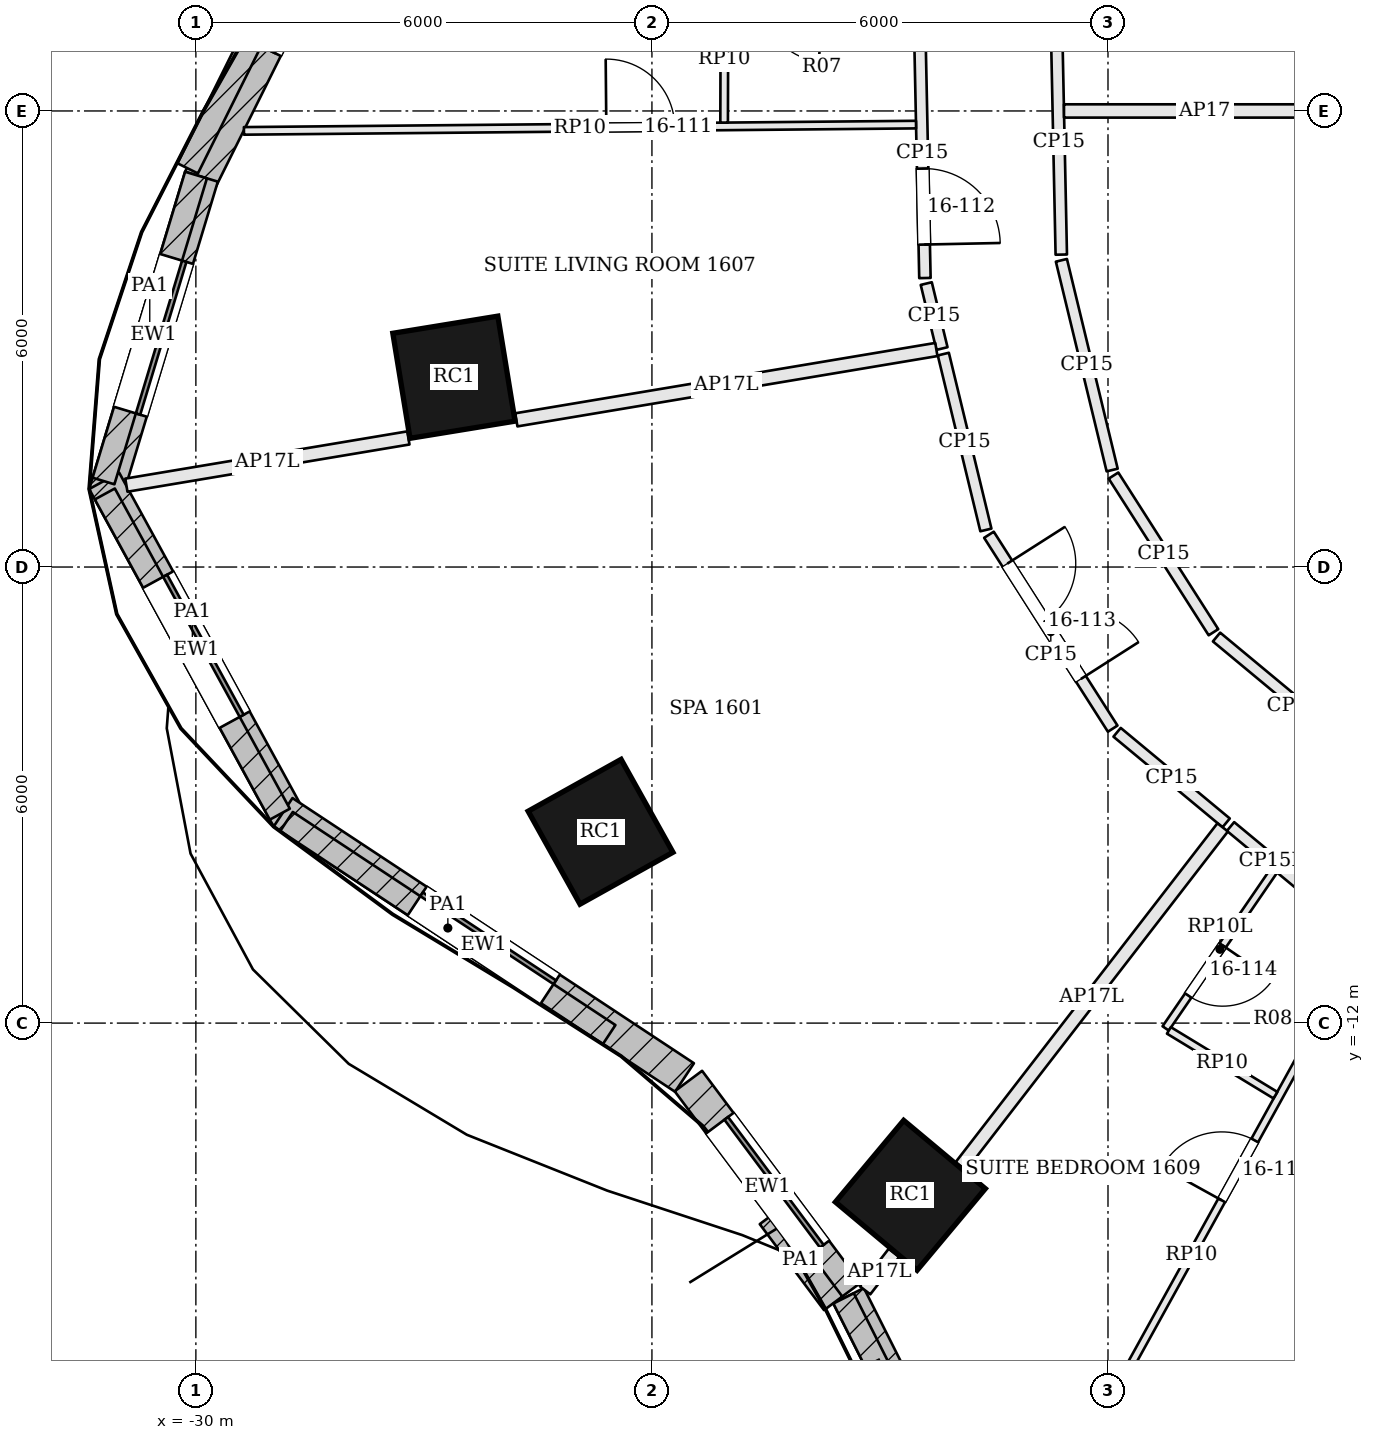
"""IFC4 building model, lengths in metres.
Left out: names, types, materials, properties, quantities, classifications, styles, units other than length and angle.
Written with IfcOpenShell. Run it as: python <this file> out.ifc"""

import sys

from ifc_helpers import new_model, si_unit, direction, frame, frame_2d, origin, origin_2d, place, context, subcontext, project, spatial, rectangle, extrude, element, fill, save


model = new_model("IFC4")
c1 = context("Model", 3, precision=1e-05, world=origin(), true_north=direction((0.0, 1.0)))
c2 = subcontext(c1, "Body", "Model", "MODEL_VIEW")
j1 = project(units=[si_unit("LENGTHUNIT", "METRE"), si_unit("PLANEANGLEUNIT", "RADIAN")], contexts=[c1])
p1 = place(None, origin())
s1 = spatial("IfcSite", under=j1, at=p1, CompositionType="ELEMENT")
p2 = place(p1, origin())
s2 = spatial("IfcBuilding", under=s1, at=p2, CompositionType="ELEMENT")
p3 = place(p2, frame((0.0, 0.0, 73.5)))
s3 = spatial("IfcBuildingStorey", under=s2, at=p3, CompositionType="ELEMENT", Elevation=73.5)
for number, where, z_axis, x_axis in (
    (1, (-26.605, -3.503, 0.0), (0.0, 0.0, 1.0), (0.161, -0.987, 0.0)),
    (2, (-24.676, -9.483, 0.0), (0.0, 0.0, 1.0), (0.487, -0.873, 0.0)),
    (3, (-20.6, -14.266, 0.0), (0.0, 0.0, 1.0), (0.767, -0.641, 0.0)),
):
    element("IfcColumn", number, at=place(p3, frame(where, z_axis=z_axis, x_axis=x_axis)), inside=s3, PredefinedType="COLUMN", context=c2, shape_type="SweptSolid", body=[
        extrude(rectangle(XDim=1.4, YDim=1.4, at=origin_2d()), origin(), (0.0, 0.0, 1.0), 2.8),
    ])
p4 = place(p3, frame((-27.294, 4.427, 0.0), z_axis=(0.0, 0.0, 1.0), x_axis=(-0.444913249375, -0.895573671191, 0.0)))
e4 = element("IfcWall", 4, at=p4, inside=s3, PredefinedType="SOLIDWALL", context=c2, shape_type="SweptSolid", body=[
    extrude(rectangle(XDim=5.947, YDim=0.45, at=frame_2d((2.974, 0.0))), origin(), (0.0, 0.0, 1.0), 3.3),
])
p5 = place(p4, frame((1.924, 0.0, 0.9)))
e5 = element("IfcOpeningElement", 5, at=p5, cuts=e4, PredefinedType="OPENING", context=c2, shape_type="SweptSolid", body=[
    extrude(rectangle(XDim=2.1, YDim=1.8, at=frame_2d((1.05, 0.9))), frame((0.0, 0.235, 0.0), z_axis=(0.0, -1.0, 0.0), x_axis=(1.0, 0.0, 0.0)), (0.0, 0.0, 1.0), 0.47),
])
p6 = place(p3, frame((-29.927, -0.865, 0.0), z_axis=(0.0, 0.0, 1.0), x_axis=(-0.289432445378, -0.957198443147, 0.0)))
e6 = element("IfcWall", 6, at=p6, inside=s3, PredefinedType="SOLIDWALL", context=c2, shape_type="SweptSolid", body=[
    extrude(rectangle(XDim=4.361, YDim=0.45, at=frame_2d((2.181, 0.0))), origin(), (0.0, 0.0, 1.0), 3.3),
])
p7 = place(p6, frame((1.131, 0.0, 0.9)))
e7 = element("IfcOpeningElement", 7, at=p7, cuts=e6, PredefinedType="OPENING", context=c2, shape_type="SweptSolid", body=[
    extrude(rectangle(XDim=2.1, YDim=1.8, at=frame_2d((1.05, 0.9))), frame((0.0, 0.235, 0.0), z_axis=(0.0, -1.0, 0.0), x_axis=(1.0, 0.0, 0.0)), (0.0, 0.0, 1.0), 0.47),
])
p8 = place(p3, frame((-31.207, -4.866, 0.0), z_axis=(0.0, 0.0, 1.0), x_axis=(0.479565142605, -0.877506281458, 0.0)))
e8 = element("IfcWall", 8, at=p8, inside=s3, PredefinedType="SOLIDWALL", context=c2, shape_type="SweptSolid", body=[
    extrude(rectangle(XDim=5.061, YDim=0.45, at=frame_2d((2.53, 0.0))), origin(), (0.0, 0.0, 1.0), 3.3),
])
p9 = place(p8, frame((1.48, 0.0, 0.9)))
e9 = element("IfcOpeningElement", 9, at=p9, cuts=e8, PredefinedType="OPENING", context=c2, shape_type="SweptSolid", body=[
    extrude(rectangle(XDim=2.1, YDim=1.8, at=frame_2d((1.05, 0.9))), frame((0.0, 0.235, 0.0), z_axis=(0.0, -1.0, 0.0), x_axis=(1.0, 0.0, 0.0)), (0.0, 0.0, 1.0), 0.47),
])
p10 = place(p3, frame((-28.853, -9.227, 0.0), z_axis=(0.0, 0.0, 1.0), x_axis=(0.834404370393, -0.551152743502, 0.0)))
e10 = element("IfcWall", 10, at=p10, inside=s3, PredefinedType="SOLIDWALL", context=c2, shape_type="SweptSolid", body=[
    extrude(rectangle(XDim=6.33, YDim=0.45, at=frame_2d((3.165, 0.0))), origin(), (0.0, 0.0, 1.0), 3.3),
])
p11 = place(p10, frame((2.115, 0.0, 0.9)))
e11 = element("IfcOpeningElement", 11, at=p11, cuts=e10, PredefinedType="OPENING", context=c2, shape_type="SweptSolid", body=[
    extrude(rectangle(XDim=2.1, YDim=1.8, at=frame_2d((1.05, 0.9))), frame((0.0, 0.235, 0.0), z_axis=(0.0, -1.0, 0.0), x_axis=(1.0, 0.0, 0.0)), (0.0, 0.0, 1.0), 0.47),
])
p12 = place(p3, frame((-23.52, -12.762, 0.0), z_axis=(0.0, 0.0, 1.0), x_axis=(0.598664281495, -0.801000048728, 0.0)))
e12 = element("IfcWall", 12, at=p12, inside=s3, PredefinedType="SOLIDWALL", context=c2, shape_type="SweptSolid", body=[
    extrude(rectangle(XDim=3.482, YDim=0.45, at=frame_2d((1.741, 0.0))), origin(), (0.0, 0.0, 1.0), 3.3),
])
p13 = place(p12, frame((0.691, 0.0, 0.9)))
e13 = element("IfcOpeningElement", 13, at=p13, cuts=e12, PredefinedType="OPENING", context=c2, shape_type="SweptSolid", body=[
    extrude(rectangle(XDim=2.1, YDim=1.8, at=frame_2d((1.05, 0.9))), frame((0.0, 0.235, 0.0), z_axis=(0.0, -1.0, 0.0), x_axis=(1.0, 0.0, 0.0)), (0.0, 0.0, 1.0), 0.47),
])
p14 = place(p3, frame((-21.413, -15.586, 0.0), z_axis=(0.0, 0.0, 1.0), x_axis=(0.449428064685, -0.893316525467, 0.0)))
e14 = element("IfcWall", 14, at=p14, inside=s3, PredefinedType="SOLIDWALL", context=c2, shape_type="SweptSolid", body=[
    extrude(rectangle(XDim=4.407, YDim=0.45, at=frame_2d((2.204, 0.0))), origin(), (0.0, 0.0, 1.0), 3.3),
])
p15 = place(p14, frame((1.154, 0.0, 0.9)))
e15 = element("IfcOpeningElement", 15, at=p15, cuts=e14, PredefinedType="OPENING", context=c2, shape_type="SweptSolid", body=[
    extrude(rectangle(XDim=2.1, YDim=1.8, at=frame_2d((1.05, 0.9))), frame((0.0, 0.235, 0.0), z_axis=(0.0, -1.0, 0.0), x_axis=(1.0, 0.0, 0.0)), (0.0, 0.0, 1.0), 0.47),
])
p16 = place(p3, frame((-27.859, 3.771, 3.6), z_axis=(0.0, 0.0, 1.0), x_axis=(-0.444912677503, -0.895573955292, 0.0)))
e16 = element("IfcWall", 16, at=p16, inside=s3, PredefinedType="PARAPET", context=c2, shape_type="SweptSolid", body=[
    extrude(rectangle(XDim=5.054, YDim=0.3, at=frame_2d((2.527, 0.0))), origin(), (0.0, 0.0, 1.0), 1.1),
])
p17 = place(p3, frame((-29.998, -0.843, 3.6), z_axis=(0.0, 0.0, 1.0), x_axis=(-0.289403108737, -0.95720731331, 0.0)))
e17 = element("IfcWall", 17, at=p17, inside=s3, PredefinedType="PARAPET", context=c2, shape_type="SweptSolid", body=[
    extrude(rectangle(XDim=4.205, YDim=0.3, at=frame_2d((2.103, 0.0))), origin(), (0.0, 0.0, 1.0), 1.1),
])
p18 = place(p3, frame((-31.198, -5.039, 3.6), z_axis=(0.0, 0.0, 1.0), x_axis=(0.479564593641, -0.877506581472, 0.0)))
e18 = element("IfcWall", 18, at=p18, inside=s3, PredefinedType="PARAPET", context=c2, shape_type="SweptSolid", body=[
    extrude(rectangle(XDim=4.801, YDim=0.3, at=frame_2d((2.4, 0.0))), origin(), (0.0, 0.0, 1.0), 1.1),
])
p19 = place(p3, frame((-28.807, -9.347, 3.6), z_axis=(0.0, 0.0, 1.0), x_axis=(0.834390896723, -0.551173141097, 0.0)))
e19 = element("IfcWall", 19, at=p19, inside=s3, PredefinedType="PARAPET", context=c2, shape_type="SweptSolid", body=[
    extrude(rectangle(XDim=5.087, YDim=0.3, at=frame_2d((2.543, 0.0))), origin(), (0.0, 0.0, 1.0), 1.1),
])
p20 = place(p3, frame((-22.461, -14.555, 3.6), z_axis=(0.0, 0.0, 1.0), x_axis=(0.598672247422, -0.800994094964, 0.0)))
e20 = element("IfcWall", 20, at=p20, inside=s3, PredefinedType="PARAPET", context=c2, shape_type="SweptSolid", body=[
    extrude(rectangle(XDim=1.413, YDim=0.3, at=frame_2d((0.707, 0.0))), origin(), (0.0, 0.0, 1.0), 1.1),
])
p21 = place(p3, frame((-21.479, -15.622, 3.6), z_axis=(0.0, 0.0, 1.0), x_axis=(0.44940640722, -0.893327421022, 0.0)))
e21 = element("IfcWall", 21, at=p21, inside=s3, PredefinedType="PARAPET", context=c2, shape_type="SweptSolid", body=[
    extrude(rectangle(XDim=4.317, YDim=0.3, at=frame_2d((2.159, 0.0))), origin(), (0.0, 0.0, 1.0), 1.1),
])
p22 = place(p3, frame((-20.477, 1.092, 0.0), z_axis=(0.0, 0.0, 1.0), x_axis=(0.020774736247, -0.999784181878, 0.0)))
e22 = element("IfcWall", 22, at=p22, inside=s3, PredefinedType="PARTITIONING", context=c2, shape_type="SweptSolid", body=[
    extrude(rectangle(XDim=3.291, YDim=0.15, at=frame_2d((1.645, 0.0))), origin(), (0.0, 0.0, 1.0), 2.684),
])
p23 = place(p22, frame((1.85, 0.0, 0.0)))
e23 = element("IfcOpeningElement", 23, at=p23, cuts=e22, PredefinedType="OPENING", context=c2, shape_type="SweptSolid", body=[
    extrude(rectangle(XDim=1.0, YDim=2.1, at=frame_2d((0.5, 1.05))), frame((0.0, 0.085, 0.0), z_axis=(0.0, -1.0, 0.0), x_axis=(1.0, 0.0, 0.0)), (0.0, 0.0, 1.0), 0.17),
])
p24 = place(p3, frame((-20.391, -2.271, 0.0), z_axis=(0.0, 0.0, 1.0), x_axis=(0.235147086106, -0.971959797469, 0.0)))
e24 = element("IfcWall", 24, at=p24, inside=s3, PredefinedType="PARTITIONING", context=c2, shape_type="SweptSolid", body=[
    extrude(rectangle(XDim=0.879, YDim=0.15, at=frame_2d((0.44, 0.0))), origin(), (0.0, 0.0, 1.0), 2.684),
])
p25 = place(p3, frame((-30.914, -4.923, 0.0), z_axis=(0.0, 0.0, 1.0), x_axis=(0.986255007441, 0.165230324995, 0.0)))
e25 = element("IfcWall", 25, at=p25, inside=s3, PredefinedType="PARTITIONING", context=c2, shape_type="SweptSolid", body=[
    extrude(rectangle(XDim=3.762, YDim=0.175, at=frame_2d((1.881, 0.0))), origin(), (0.0, 0.0, 1.0), 2.28),
])
p26 = place(p3, frame((-25.784, -4.064, 0.0), z_axis=(0.0, 0.0, 1.0), x_axis=(0.986261705635, 0.165190338697, 0.0)))
e26 = element("IfcWall", 26, at=p26, inside=s3, PredefinedType="PARTITIONING", context=c2, shape_type="SweptSolid", body=[
    extrude(rectangle(XDim=5.603, YDim=0.175, at=frame_2d((2.801, 0.0))), origin(), (0.0, 0.0, 1.0), 2.28),
])
p27 = place(p3, frame((-20.167, -3.199, 0.0), z_axis=(0.0, 0.0, 1.0), x_axis=(0.235288843044, -0.971925491146, 0.0)))
e27 = element("IfcWall", 27, at=p27, inside=s3, PredefinedType="PARTITIONING", context=c2, shape_type="SweptSolid", body=[
    extrude(rectangle(XDim=2.38, YDim=0.15, at=frame_2d((1.19, 0.0))), origin(), (0.0, 0.0, 1.0), 2.684),
])
p28 = place(p3, frame((-19.566, -5.575, 0.0), z_axis=(0.0, 0.0, 1.0), x_axis=(0.538039111825, -0.842919874096, 0.0)))
e28 = element("IfcWall", 28, at=p28, inside=s3, PredefinedType="PARTITIONING", context=c2, shape_type="SweptSolid", body=[
    extrude(rectangle(XDim=3.026, YDim=0.15, at=frame_2d((1.513, 0.0))), origin(), (0.0, 0.0, 1.0), 2.684),
])
p29 = place(p28, frame((0.45, 0.0, 0.0)))
e29 = element("IfcOpeningElement", 29, at=p29, cuts=e28, PredefinedType="OPENING", context=c2, shape_type="SweptSolid", body=[
    extrude(rectangle(XDim=1.8, YDim=2.1, at=frame_2d((0.9, 1.05))), frame((0.0, 0.085, 0.0), z_axis=(0.0, -1.0, 0.0), x_axis=(1.0, 0.0, 0.0)), (0.0, 0.0, 1.0), 0.17),
])
p30 = place(p3, frame((-17.88, -8.174, 0.0), z_axis=(0.0, 0.0, 1.0), x_axis=(0.769400173999, -0.638767071983, 0.0)))
e30 = element("IfcWall", 30, at=p30, inside=s3, PredefinedType="PARTITIONING", context=c2, shape_type="SweptSolid", body=[
    extrude(rectangle(XDim=1.865, YDim=0.15, at=frame_2d((0.933, 0.0))), origin(), (0.0, 0.0, 1.0), 2.684),
])
p31 = place(p3, frame((-21.197, -15.515, 0.0), z_axis=(0.0, 0.0, 1.0), x_axis=(0.61138040292, 0.791336845424, 0.0)))
e31 = element("IfcWall", 31, at=p31, inside=s3, PredefinedType="PARTITIONING", context=c2, shape_type="SweptSolid", body=[
    extrude(rectangle(XDim=0.621, YDim=0.175, at=frame_2d((0.311, 0.0))), origin(), (0.0, 0.0, 1.0), 2.28),
])
p32 = place(p3, frame((-19.936, -13.883, 0.0), z_axis=(0.0, 0.0, 1.0), x_axis=(0.611393230735, 0.791326934592, 0.0)))
e32 = element("IfcWall", 32, at=p32, inside=s3, PredefinedType="PARTITIONING", context=c2, shape_type="SweptSolid", body=[
    extrude(rectangle(XDim=5.634, YDim=0.175, at=frame_2d((2.817, 0.0))), origin(), (0.0, 0.0, 1.0), 2.28),
])
p33 = place(p3, frame((-16.388, -9.414, 0.0), z_axis=(0.0, 0.0, 1.0), x_axis=(0.76933395119, -0.638846829487, 0.0)))
e33 = element("IfcWall", 33, at=p33, inside=s3, PredefinedType="PARTITIONING", context=c2, shape_type="SweptSolid", body=[
    extrude(rectangle(XDim=1.401, YDim=0.15, at=frame_2d((0.701, 0.0))), origin(), (0.0, 0.0, 1.0), 2.58),
])
p34 = place(p3, frame((-14.388, -8.734, 0.0), z_axis=(0.0, 0.0, 1.0), x_axis=(-0.769376381092, 0.63879572965, 0.0)))
e34 = element("IfcWall", 34, at=p34, inside=s3, PredefinedType="PARTITIONING", context=c2, shape_type="SweptSolid", body=[
    extrude(rectangle(XDim=2.838, YDim=0.15, at=frame_2d((1.419, 0.0))), origin(), (0.0, 0.0, 1.0), 2.58),
])
p35 = place(p3, frame((-16.612, -6.858, 0.0), z_axis=(0.0, 0.0, 1.0), x_axis=(-0.53797355371, 0.842961716514, 0.0)))
e35 = element("IfcWall", 35, at=p35, inside=s3, PredefinedType="PARTITIONING", context=c2, shape_type="SweptSolid", body=[
    extrude(rectangle(XDim=2.445, YDim=0.15, at=frame_2d((1.222, 0.0))), origin(), (0.0, 0.0, 1.0), 2.684),
])
p36 = place(p3, frame((-17.945, -4.724, 0.0), z_axis=(0.0, 0.0, 1.0), x_axis=(-0.235203730389, 0.971946091721, 0.0)))
e36 = element("IfcWall", 36, at=p36, inside=s3, PredefinedType="PARTITIONING", context=c2, shape_type="SweptSolid", body=[
    extrude(rectangle(XDim=2.839, YDim=0.15, at=frame_2d((1.419, 0.0))), origin(), (0.0, 0.0, 1.0), 2.684),
])
p37 = place(p3, frame((-18.615, -1.89, 0.0), z_axis=(0.0, 0.0, 1.0), x_axis=(-0.020789300895, 0.99978387913, 0.0)))
e37 = element("IfcWall", 37, at=p37, inside=s3, PredefinedType="PARTITIONING", context=c2, shape_type="SweptSolid", body=[
    extrude(rectangle(XDim=2.959, YDim=0.15, at=frame_2d((1.48, 0.0))), origin(), (0.0, 0.0, 1.0), 2.684),
])
p38 = place(p3, frame((-29.368, -0.262, 0.0), z_axis=(0.0, 0.0, 1.0), x_axis=(0.999956200621, 0.009359318369, 0.0)))
e38 = element("IfcWall", 38, at=p38, inside=s3, PredefinedType="PARTITIONING", context=c2, shape_type="SweptSolid", body=[
    extrude(rectangle(XDim=8.843, YDim=0.1, at=frame_2d((4.421, 0.0))), origin(), (0.0, 0.0, 1.0), 2.784),
])
p39 = place(p38, frame((4.768, 0.0, 0.0)))
e39 = element("IfcOpeningElement", 39, at=p39, cuts=e38, PredefinedType="OPENING", context=c2, shape_type="SweptSolid", body=[
    extrude(rectangle(XDim=0.9, YDim=2.4, at=frame_2d((0.45, 1.2))), frame((0.0, 0.06, 0.0), z_axis=(0.0, -1.0, 0.0), x_axis=(1.0, 0.0, 0.0)), (0.0, 0.0, 1.0), 0.12),
])
p40 = place(p3, frame((-23.045, 1.533, 0.0), z_axis=(0.0, 0.0, 1.0), x_axis=(-0.002895601007, -0.999995807739, 0.0)))
e40 = element("IfcWall", 40, at=p40, inside=s3, PredefinedType="PARTITIONING", context=c2, shape_type="SweptSolid", body=[
    extrude(rectangle(XDim=1.686, YDim=0.1, at=frame_2d((0.843, 0.0))), origin(), (0.0, 0.0, 1.0), 2.784),
])
p41 = place(p3, frame((-19.269, -19.337, 0.0), z_axis=(0.0, 0.0, 1.0), x_axis=(0.483529323195, 0.875328163383, 0.0)))
e41 = element("IfcWall", 41, at=p41, inside=s3, PredefinedType="PARTITIONING", context=c2, shape_type="SweptSolid", body=[
    extrude(rectangle(XDim=9.794, YDim=0.1, at=frame_2d((4.897, 0.0))), origin(), (0.0, 0.0, 1.0), 2.784),
])
p42 = place(p41, frame((5.719, 0.0, 0.0)))
e42 = element("IfcOpeningElement", 42, at=p42, cuts=e41, PredefinedType="OPENING", context=c2, shape_type="SweptSolid", body=[
    extrude(rectangle(XDim=0.9, YDim=2.4, at=frame_2d((0.45, 1.2))), frame((0.0, 0.06, 0.0), z_axis=(0.0, -1.0, 0.0), x_axis=(1.0, 0.0, 0.0)), (0.0, 0.0, 1.0), 0.12),
])
p43 = place(p3, frame((-15.813, -9.988, 0.0), z_axis=(0.0, 0.0, 1.0), x_axis=(-0.565740671071, -0.824583223875, 0.0)))
e43 = element("IfcWall", 43, at=p43, inside=s3, PredefinedType="PARTITIONING", context=c2, shape_type="SweptSolid", body=[
    extrude(rectangle(XDim=2.525, YDim=0.1, at=frame_2d((1.262, 0.0))), origin(), (0.0, 0.0, 1.0), 2.58),
])
p44 = place(p43, frame((1.2, 0.0, 0.0)))
e44 = element("IfcOpeningElement", 44, at=p44, cuts=e43, PredefinedType="OPENING", context=c2, shape_type="SweptSolid", body=[
    extrude(rectangle(XDim=0.8, YDim=2.1, at=frame_2d((0.4, 1.05))), frame((0.0, 0.06, 0.0), z_axis=(0.0, -1.0, 0.0), x_axis=(1.0, 0.0, 0.0)), (0.0, 0.0, 1.0), 0.12),
])
p45 = place(p3, frame((-17.198, -12.096, 0.0), z_axis=(0.0, 0.0, 1.0), x_axis=(0.85445715852, -0.51952186119, 0.0)))
e45 = element("IfcWall", 45, at=p45, inside=s3, PredefinedType="PARTITIONING", context=c2, shape_type="SweptSolid", body=[
    extrude(rectangle(XDim=1.64, YDim=0.1, at=frame_2d((0.82, 0.0))), origin(), (0.0, 0.0, 1.0), 2.784),
])
p46 = place(p3, frame((-18.579, 0.0, 0.0), z_axis=(0.0, 0.0, 1.0), x_axis=(1.0, 0.0, 0.0)))
e46 = element("IfcWall", 46, at=p46, inside=s3, PredefinedType="PARTITIONING", context=c2, shape_type="SweptSolid", body=[
    extrude(rectangle(XDim=3.704, YDim=0.175, at=frame_2d((1.852, 0.0))), origin(), (0.0, 0.0, 1.0), 2.798),
])
p47 = place(p5, origin())
e47 = element("IfcWindow", 47, at=p47, inside=s3, PartitioningType="SINGLE_PANEL", PredefinedType="WINDOW", context=c2, shape_type="SweptSolid", body=[
    extrude(rectangle(XDim=2.1, YDim=1.8, at=frame_2d((1.05, 0.9))), frame((0.0, 0.135, 0.0), z_axis=(0.0, -1.0, 0.0), x_axis=(1.0, 0.0, 0.0)), (0.0, 0.0, 1.0), 0.06),
])
fill(e5, e47)
p48 = place(p7, origin())
e48 = element("IfcWindow", 48, at=p48, inside=s3, PartitioningType="SINGLE_PANEL", PredefinedType="WINDOW", context=c2, shape_type="SweptSolid", body=[
    extrude(rectangle(XDim=2.1, YDim=1.8, at=frame_2d((1.05, 0.9))), frame((0.0, 0.135, 0.0), z_axis=(0.0, -1.0, 0.0), x_axis=(1.0, 0.0, 0.0)), (0.0, 0.0, 1.0), 0.06),
])
fill(e7, e48)
p49 = place(p9, origin())
e49 = element("IfcWindow", 49, at=p49, inside=s3, PartitioningType="SINGLE_PANEL", PredefinedType="WINDOW", context=c2, shape_type="SweptSolid", body=[
    extrude(rectangle(XDim=2.1, YDim=1.8, at=frame_2d((1.05, 0.9))), frame((0.0, 0.135, 0.0), z_axis=(0.0, -1.0, 0.0), x_axis=(1.0, 0.0, 0.0)), (0.0, 0.0, 1.0), 0.06),
])
fill(e9, e49)
p50 = place(p11, origin())
e50 = element("IfcWindow", 50, at=p50, inside=s3, PartitioningType="SINGLE_PANEL", PredefinedType="WINDOW", context=c2, shape_type="SweptSolid", body=[
    extrude(rectangle(XDim=2.1, YDim=1.8, at=frame_2d((1.05, 0.9))), frame((0.0, 0.135, 0.0), z_axis=(0.0, -1.0, 0.0), x_axis=(1.0, 0.0, 0.0)), (0.0, 0.0, 1.0), 0.06),
])
fill(e11, e50)
p51 = place(p13, origin())
e51 = element("IfcWindow", 51, at=p51, inside=s3, PartitioningType="SINGLE_PANEL", PredefinedType="WINDOW", context=c2, shape_type="SweptSolid", body=[
    extrude(rectangle(XDim=2.1, YDim=1.8, at=frame_2d((1.05, 0.9))), frame((0.0, 0.135, 0.0), z_axis=(0.0, -1.0, 0.0), x_axis=(1.0, 0.0, 0.0)), (0.0, 0.0, 1.0), 0.06),
])
fill(e13, e51)
p52 = place(p39, origin())
e52 = element("IfcDoor", 52, at=p52, inside=s3, OperationType="SINGLE_SWING_LEFT", PredefinedType="DOOR", context=c2, shape_type="SweptSolid", body=[
    extrude(rectangle(XDim=0.9, YDim=2.4, at=frame_2d((0.45, 1.2))), frame((0.0, 0.025, 0.0), z_axis=(0.0, -1.0, 0.0), x_axis=(1.0, 0.0, 0.0)), (0.0, 0.0, 1.0), 0.05),
])
fill(e39, e52)
p53 = place(p23, origin())
e53 = element("IfcDoor", 53, at=p53, inside=s3, OperationType="SINGLE_SWING_RIGHT", PredefinedType="DOOR", context=c2, shape_type="SweptSolid", body=[
    extrude(rectangle(XDim=1.0, YDim=2.1, at=frame_2d((0.5, 1.05))), frame((0.0, 0.025, 0.0), z_axis=(0.0, -1.0, 0.0), x_axis=(1.0, 0.0, 0.0)), (0.0, 0.0, 1.0), 0.05),
])
fill(e23, e53)
p54 = place(p29, origin())
e54 = element("IfcDoor", 54, at=p54, inside=s3, OperationType="DOUBLE_DOOR_SINGLE_SWING", PredefinedType="DOOR", context=c2, shape_type="SweptSolid", body=[
    extrude(rectangle(XDim=1.8, YDim=2.1, at=frame_2d((0.9, 1.05))), frame((0.0, 0.025, 0.0), z_axis=(0.0, -1.0, 0.0), x_axis=(1.0, 0.0, 0.0)), (0.0, 0.0, 1.0), 0.05),
])
fill(e29, e54)
p55 = place(p44, origin())
e55 = element("IfcDoor", 55, at=p55, inside=s3, OperationType="SINGLE_SWING_LEFT", PredefinedType="DOOR", context=c2, shape_type="SweptSolid", body=[
    extrude(rectangle(XDim=0.8, YDim=2.1, at=frame_2d((0.4, 1.05))), frame((0.0, 0.025, 0.0), z_axis=(0.0, -1.0, 0.0), x_axis=(1.0, 0.0, 0.0)), (0.0, 0.0, 1.0), 0.05),
])
fill(e44, e55)
p56 = place(p42, origin())
e56 = element("IfcDoor", 56, at=p56, inside=s3, OperationType="SINGLE_SWING_LEFT", PredefinedType="DOOR", context=c2, shape_type="SweptSolid", body=[
    extrude(rectangle(XDim=0.9, YDim=2.4, at=frame_2d((0.45, 1.2))), frame((0.0, 0.025, 0.0), z_axis=(0.0, -1.0, 0.0), x_axis=(1.0, 0.0, 0.0)), (0.0, 0.0, 1.0), 0.05),
])
fill(e42, e56)
save(model, sys.argv[1])
